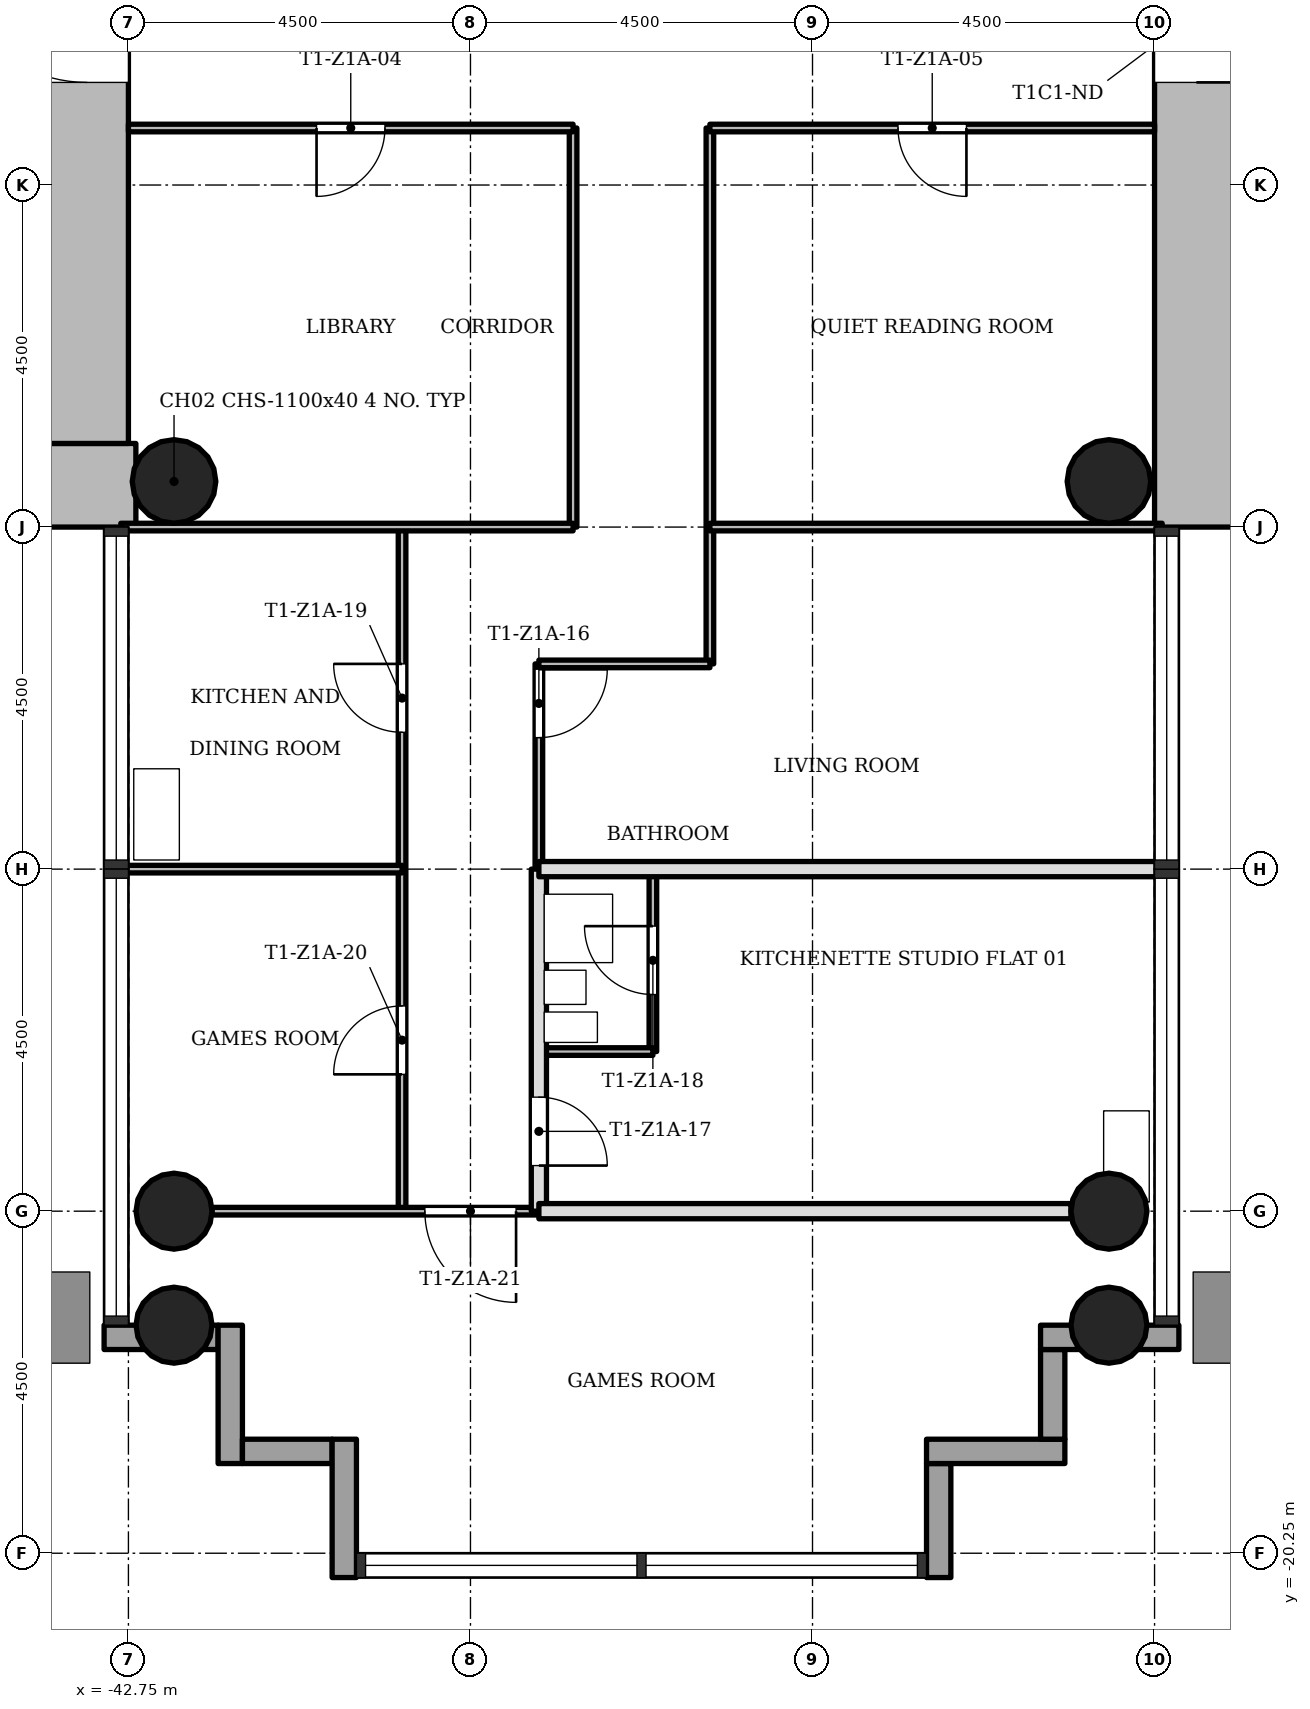
"""IFC4 building model, lengths in metres.
Left out: names, types, materials, properties, quantities, classifications, styles, units other than length and angle.
Written with IfcOpenShell. Run it as: python <this file> out.ifc"""

import sys

from ifc_helpers import new_model, si_unit, direction, frame, frame_2d, origin, origin_2d, place, context, subcontext, project, spatial, rectangle, hollow_circle, extrude, element, fill, save


model = new_model("IFC4")
c1 = context("Model", 3, precision=1e-05, world=origin(), true_north=direction((0.0, 1.0)))
c2 = subcontext(c1, "Body", "Model", "MODEL_VIEW")
j1 = project(units=[si_unit("LENGTHUNIT", "METRE"), si_unit("PLANEANGLEUNIT", "RADIAN")], contexts=[c1])
p1 = place(None, origin())
s1 = spatial("IfcSite", under=j1, at=p1, CompositionType="ELEMENT")
p2 = place(p1, origin())
s2 = spatial("IfcBuilding", under=s1, at=p2, CompositionType="ELEMENT")
p3 = place(p2, frame((0.0, 0.0, 31.3)))
s3 = spatial("IfcBuildingStorey", under=s2, at=p3, CompositionType="ELEMENT", Elevation=31.3)
p4 = place(p3, frame((-28.7, 5.65, 0.0), z_axis=(0.0, 0.0, 1.0), x_axis=(0.0, -1.0, 0.0)))
e1 = element("IfcWall", 1, at=p4, inside=s3, PredefinedType="SHEAR", context=c2, shape_type="SweptSolid", body=[
    extrude(rectangle(XDim=12.4, YDim=1.1, at=frame_2d((6.2, 0.0))), origin(), (0.0, 0.0, 1.0), 3.4),
])
p5 = place(p4, frame((4.75, 0.0, 0.0)))
e2 = element("IfcOpeningElement", 2, at=p5, cuts=e1, PredefinedType="OPENING", context=c2, shape_type="SweptSolid", body=[
    extrude(rectangle(XDim=1.8, YDim=2.1, at=frame_2d((0.9, 1.05))), frame((0.0, 0.56, 0.0), z_axis=(0.0, -1.0, 0.0), x_axis=(1.0, 0.0, 0.0)), (0.0, 0.0, 1.0), 1.12),
])
p6 = place(p3, frame((-50.65, -6.2, 0.0), z_axis=(0.0, 0.0, 1.0), x_axis=(1.0, 0.0, 0.0)))
e3 = element("IfcWall", 3, at=p6, inside=s3, PredefinedType="SHEAR", context=c2, shape_type="SweptSolid", body=[
    extrude(rectangle(XDim=7.998, YDim=1.1, at=frame_2d((3.999, 0.0))), origin(), (0.0, 0.0, 1.0), 3.4),
])
p7 = place(p3, frame((-43.3, -5.65, 0.0), z_axis=(0.0, 0.0, 1.0), x_axis=(0.0, 1.0, 0.0)))
e4 = element("IfcWall", 4, at=p7, inside=s3, PredefinedType="SHEAR", context=c2, shape_type="SweptSolid", body=[
    extrude(rectangle(XDim=12.4, YDim=1.1, at=frame_2d((6.2, 0.0))), origin(), (0.0, 0.0, 1.0), 3.4),
])
p8 = place(p7, frame((4.75, 0.0, 0.0)))
e5 = element("IfcOpeningElement", 5, at=p8, cuts=e4, PredefinedType="OPENING", context=c2, shape_type="SweptSolid", body=[
    extrude(rectangle(XDim=1.8, YDim=2.1, at=frame_2d((0.9, 1.05))), frame((0.0, 0.56, 0.0), z_axis=(0.0, -1.0, 0.0), x_axis=(1.0, 0.0, 0.0)), (0.0, 0.0, 1.0), 1.12),
])
for number, where, z_axis, x_axis in (
    (6, (-42.15, -15.75, 0.0), (0.0, 0.0, 1.0), (1.0, 0.0, 0.0)),
    (7, (-29.85, -15.75, 0.0), (0.0, 0.0, 1.0), (1.0, 0.0, 0.0)),
    (8, (-42.15, -17.25, 0.0), (0.0, 0.0, 1.0), (1.0, 0.0, 0.0)),
    (9, (-29.85, -17.25, 0.0), (0.0, 0.0, 1.0), (1.0, 0.0, 0.0)),
):
    element("IfcColumn", number, at=place(p3, frame(where, z_axis=z_axis, x_axis=x_axis)), inside=s3, PredefinedType="COLUMN", context=c2, shape_type="SweptSolid", body=[
        extrude(hollow_circle(Radius=0.5, WallThickness=0.036, at=origin_2d()), origin(), (0.0, 0.0, 1.0), 3.4),
    ])
for number, where, z_axis, x_axis in (
    (10, (-42.15, -6.15, 0.0), (0.0, 0.0, 1.0), (1.0, 0.0, 0.0)),
    (11, (-29.85, -6.15, 0.0), (0.0, 0.0, 1.0), (1.0, 0.0, 0.0)),
):
    element("IfcColumn", number, at=place(p3, frame(where, z_axis=z_axis, x_axis=x_axis)), inside=s3, PredefinedType="COLUMN", context=c2, shape_type="SweptSolid", body=[
        extrude(hollow_circle(Radius=0.55, WallThickness=0.04, at=origin_2d()), origin(), (0.0, 0.0, 1.0), 3.4),
    ])
p9 = place(p3, frame((-43.07, -17.41, -0.3), z_axis=(0.0, 0.0, 1.0), x_axis=(1.0, 0.0, 0.0)))
e12 = element("IfcWall", 12, at=p9, inside=s3, PredefinedType="STANDARD", context=c2, shape_type="SweptSolid", body=[
    extrude(rectangle(XDim=1.5, YDim=0.32, at=frame_2d((0.75, 0.0))), origin(), (0.0, 0.0, 1.0), 3.4),
])
p10 = place(p3, frame((-41.41, -17.25, -0.3), z_axis=(0.0, 0.0, 1.0), x_axis=(0.0, -1.0, 0.0)))
e13 = element("IfcWall", 13, at=p10, inside=s3, PredefinedType="STANDARD", context=c2, shape_type="SweptSolid", body=[
    extrude(rectangle(XDim=1.82, YDim=0.32, at=frame_2d((0.91, 0.0))), origin(), (0.0, 0.0, 1.0), 3.4),
])
p11 = place(p3, frame((-41.25, -18.91, -0.3), z_axis=(0.0, 0.0, 1.0), x_axis=(1.0, 0.0, 0.0)))
e14 = element("IfcWall", 14, at=p11, inside=s3, PredefinedType="STANDARD", context=c2, shape_type="SweptSolid", body=[
    extrude(rectangle(XDim=1.18, YDim=0.32, at=frame_2d((0.59, 0.0))), origin(), (0.0, 0.0, 1.0), 3.4),
])
p12 = place(p3, frame((-39.91, -18.75, -0.3), z_axis=(0.0, 0.0, 1.0), x_axis=(0.0, -1.0, 0.0)))
e15 = element("IfcWall", 15, at=p12, inside=s3, PredefinedType="STANDARD", context=c2, shape_type="SweptSolid", body=[
    extrude(rectangle(XDim=1.82, YDim=0.32, at=frame_2d((0.91, 0.0))), origin(), (0.0, 0.0, 1.0), 3.4),
])
p13 = place(p3, frame((-32.09, -20.57, -0.3), z_axis=(0.0, 0.0, 1.0), x_axis=(0.0, 1.0, 0.0)))
e16 = element("IfcWall", 16, at=p13, inside=s3, PredefinedType="STANDARD", context=c2, shape_type="SweptSolid", body=[
    extrude(rectangle(XDim=1.5, YDim=0.32, at=frame_2d((0.75, 0.0))), origin(), (0.0, 0.0, 1.0), 3.4),
])
p14 = place(p3, frame((-32.25, -18.91, -0.3), z_axis=(0.0, 0.0, 1.0), x_axis=(1.0, 0.0, 0.0)))
e17 = element("IfcWall", 17, at=p14, inside=s3, PredefinedType="STANDARD", context=c2, shape_type="SweptSolid", body=[
    extrude(rectangle(XDim=1.82, YDim=0.32, at=frame_2d((0.91, 0.0))), origin(), (0.0, 0.0, 1.0), 3.4),
])
p15 = place(p3, frame((-30.59, -18.75, -0.3), z_axis=(0.0, 0.0, 1.0), x_axis=(0.0, 1.0, 0.0)))
e18 = element("IfcWall", 18, at=p15, inside=s3, PredefinedType="STANDARD", context=c2, shape_type="SweptSolid", body=[
    extrude(rectangle(XDim=1.18, YDim=0.32, at=frame_2d((0.59, 0.0))), origin(), (0.0, 0.0, 1.0), 3.4),
])
p16 = place(p3, frame((-30.75, -17.41, -0.3), z_axis=(0.0, 0.0, 1.0), x_axis=(1.0, 0.0, 0.0)))
e19 = element("IfcWall", 19, at=p16, inside=s3, PredefinedType="STANDARD", context=c2, shape_type="SweptSolid", body=[
    extrude(rectangle(XDim=1.82, YDim=0.32, at=frame_2d((0.91, 0.0))), origin(), (0.0, 0.0, 1.0), 3.4),
])
p17 = place(p3, frame((-39.15, -15.75, 0.0), z_axis=(0.0, 0.0, 1.0), x_axis=(0.0, 1.0, 0.0)))
e20 = element("IfcWall", 20, at=p17, inside=s3, PredefinedType="PARTITIONING", context=c2, shape_type="SweptSolid", body=[
    extrude(rectangle(XDim=9.0, YDim=0.1, at=frame_2d((4.5, 0.0))), origin(), (0.0, 0.0, 1.0), 3.0),
])
p18 = place(p17, frame((6.3, 0.0, 0.0)))
e21 = element("IfcOpeningElement", 21, at=p18, cuts=e20, PredefinedType="OPENING", context=c2, shape_type="SweptSolid", body=[
    extrude(rectangle(XDim=0.9, YDim=2.1, at=frame_2d((0.45, 1.05))), frame((0.0, 0.06, 0.0), z_axis=(0.0, -1.0, 0.0), x_axis=(1.0, 0.0, 0.0)), (0.0, 0.0, 1.0), 0.12),
])
p19 = place(p17, frame((1.8, 0.0, 0.0)))
e22 = element("IfcOpeningElement", 22, at=p19, cuts=e20, PredefinedType="OPENING", context=c2, shape_type="SweptSolid", body=[
    extrude(rectangle(XDim=0.9, YDim=2.1, at=frame_2d((0.45, 1.05))), frame((0.0, 0.06, 0.0), z_axis=(0.0, -1.0, 0.0), x_axis=(1.0, 0.0, 0.0)), (0.0, 0.0, 1.0), 0.12),
])
p20 = place(p3, frame((-37.35, -11.25, 0.0), z_axis=(0.0, 0.0, 1.0), x_axis=(0.0, 1.0, 0.0)))
e23 = element("IfcWall", 23, at=p20, inside=s3, PredefinedType="PARTITIONING", context=c2, shape_type="SweptSolid", body=[
    extrude(rectangle(XDim=2.7, YDim=0.1, at=frame_2d((1.35, 0.0))), origin(), (0.0, 0.0, 1.0), 3.0),
])
p21 = place(p20, frame((1.73, 0.0, 0.0)))
e24 = element("IfcOpeningElement", 24, at=p21, cuts=e23, PredefinedType="OPENING", context=c2, shape_type="SweptSolid", body=[
    extrude(rectangle(XDim=0.9, YDim=2.1, at=frame_2d((0.45, 1.05))), frame((0.0, 0.06, 0.0), z_axis=(0.0, -1.0, 0.0), x_axis=(1.0, 0.0, 0.0)), (0.0, 0.0, 1.0), 0.12),
])
p22 = place(p3, frame((-37.35, -15.75, 0.0), z_axis=(0.0, 0.0, 1.0), x_axis=(0.0, 1.0, 0.0)))
e25 = element("IfcWall", 25, at=p22, inside=s3, PredefinedType="SOLIDWALL", context=c2, shape_type="SweptSolid", body=[
    extrude(rectangle(XDim=4.5, YDim=0.2, at=frame_2d((2.25, 0.0))), origin(), (0.0, 0.0, 1.0), 3.0),
])
p23 = place(p22, frame((0.6, 0.0, 0.0)))
e26 = element("IfcOpeningElement", 26, at=p23, cuts=e25, PredefinedType="OPENING", context=c2, shape_type="SweptSolid", body=[
    extrude(rectangle(XDim=0.9, YDim=2.1, at=frame_2d((0.45, 1.05))), frame((0.0, 0.11, 0.0), z_axis=(0.0, -1.0, 0.0), x_axis=(1.0, 0.0, 0.0)), (0.0, 0.0, 1.0), 0.22),
])
p24 = place(p3, frame((-36.9, -6.75, 0.0), z_axis=(0.0, 0.0, 1.0), x_axis=(0.0, 1.0, 0.0)))
e27 = element("IfcWall", 27, at=p24, inside=s3, PredefinedType="PARTITIONING", context=c2, shape_type="SweptSolid", body=[
    extrude(rectangle(XDim=5.25, YDim=0.1, at=frame_2d((2.625, 0.0))), origin(), (0.0, 0.0, 1.0), 3.0),
])
p25 = place(p3, frame((-35.85, -13.65, 0.0), z_axis=(0.0, 0.0, 1.0), x_axis=(0.0, 1.0, 0.0)))
e28 = element("IfcWall", 28, at=p25, inside=s3, PredefinedType="PARTITIONING", context=c2, shape_type="SweptSolid", body=[
    extrude(rectangle(XDim=2.4, YDim=0.1, at=frame_2d((1.2, 0.0))), origin(), (0.0, 0.0, 1.0), 3.0),
])
p26 = place(p25, frame((0.75, 0.0, 0.0)))
e29 = element("IfcOpeningElement", 29, at=p26, cuts=e28, PredefinedType="OPENING", context=c2, shape_type="SweptSolid", body=[
    extrude(rectangle(XDim=0.9, YDim=2.1, at=frame_2d((0.45, 1.05))), frame((0.0, 0.06, 0.0), z_axis=(0.0, -1.0, 0.0), x_axis=(1.0, 0.0, 0.0)), (0.0, 0.0, 1.0), 0.12),
])
p27 = place(p3, frame((-35.1, -8.55, 0.0), z_axis=(0.0, 0.0, 1.0), x_axis=(0.0, 1.0, 0.0)))
e30 = element("IfcWall", 30, at=p27, inside=s3, PredefinedType="PARTITIONING", context=c2, shape_type="SweptSolid", body=[
    extrude(rectangle(XDim=7.05, YDim=0.1, at=frame_2d((3.525, 0.0))), origin(), (0.0, 0.0, 1.0), 3.0),
])
p28 = place(p3, frame((-41.65, -15.75, 0.0), z_axis=(0.0, 0.0, 1.0), x_axis=(1.0, 0.0, 0.0)))
e31 = element("IfcWall", 31, at=p28, inside=s3, PredefinedType="PARTITIONING", context=c2, shape_type="SweptSolid", body=[
    extrude(rectangle(XDim=4.3, YDim=0.1, at=frame_2d((2.15, 0.0))), origin(), (0.0, 0.0, 1.0), 3.0),
])
p29 = place(p28, frame((2.8, 0.0, 0.0)))
e32 = element("IfcOpeningElement", 32, at=p29, cuts=e31, PredefinedType="OPENING", context=c2, shape_type="SweptSolid", body=[
    extrude(rectangle(XDim=1.2, YDim=2.1, at=frame_2d((0.6, 1.05))), frame((0.0, 0.06, 0.0), z_axis=(0.0, -1.0, 0.0), x_axis=(1.0, 0.0, 0.0)), (0.0, 0.0, 1.0), 0.12),
])
p30 = place(p3, frame((-37.35, -15.75, 0.0), z_axis=(0.0, 0.0, 1.0), x_axis=(1.0, 0.0, 0.0)))
e33 = element("IfcWall", 33, at=p30, inside=s3, PredefinedType="SOLIDWALL", context=c2, shape_type="SweptSolid", body=[
    extrude(rectangle(XDim=7.0, YDim=0.2, at=frame_2d((3.5, 0.0))), origin(), (0.0, 0.0, 1.0), 3.0),
])
p31 = place(p3, frame((-37.35, -13.65, 0.0), z_axis=(0.0, 0.0, 1.0), x_axis=(1.0, 0.0, 0.0)))
e34 = element("IfcWall", 34, at=p31, inside=s3, PredefinedType="PARTITIONING", context=c2, shape_type="SweptSolid", body=[
    extrude(rectangle(XDim=1.5, YDim=0.1, at=frame_2d((0.75, 0.0))), origin(), (0.0, 0.0, 1.0), 3.0),
])
p32 = place(p3, frame((-42.85, -11.25, 0.0), z_axis=(0.0, 0.0, 1.0), x_axis=(1.0, 0.0, 0.0)))
e35 = element("IfcWall", 35, at=p32, inside=s3, PredefinedType="PARTITIONING", context=c2, shape_type="SweptSolid", body=[
    extrude(rectangle(XDim=3.7, YDim=0.1, at=frame_2d((1.85, 0.0))), origin(), (0.0, 0.0, 1.0), 3.0),
])
p33 = place(p3, frame((-37.35, -11.25, 0.0), z_axis=(0.0, 0.0, 1.0), x_axis=(1.0, 0.0, 0.0)))
e36 = element("IfcWall", 36, at=p33, inside=s3, PredefinedType="SOLIDWALL", context=c2, shape_type="SweptSolid", body=[
    extrude(rectangle(XDim=8.2, YDim=0.2, at=frame_2d((4.1, 0.0))), origin(), (0.0, 0.0, 1.0), 3.0),
])
p34 = place(p3, frame((-37.35, -8.55, 0.0), z_axis=(0.0, 0.0, 1.0), x_axis=(1.0, 0.0, 0.0)))
e37 = element("IfcWall", 37, at=p34, inside=s3, PredefinedType="PARTITIONING", context=c2, shape_type="SweptSolid", body=[
    extrude(rectangle(XDim=2.25, YDim=0.1, at=frame_2d((1.125, 0.0))), origin(), (0.0, 0.0, 1.0), 3.0),
])
for number, where, z_axis, x_axis in (
    (38, (-42.85, -6.75, 0.0), (0.0, 0.0, 1.0), (1.0, 0.0, 0.0)),
    (39, (-35.1, -6.75, 0.0), (0.0, 0.0, 1.0), (1.0, 0.0, 0.0)),
):
    element("IfcWall", number, at=place(p3, frame(where, z_axis=z_axis, x_axis=x_axis)), inside=s3, PredefinedType="PARTITIONING", context=c2, shape_type="SweptSolid", body=[
        extrude(rectangle(XDim=5.95, YDim=0.1, at=frame_2d((2.975, 0.0))), origin(), (0.0, 0.0, 1.0), 3.0),
    ])
p35 = place(p3, frame((-42.75, -1.5, 0.0), z_axis=(0.0, 0.0, 1.0), x_axis=(1.0, 0.0, 0.0)))
e40 = element("IfcWall", 40, at=p35, inside=s3, PredefinedType="PARTITIONING", context=c2, shape_type="SweptSolid", body=[
    extrude(rectangle(XDim=5.85, YDim=0.1, at=frame_2d((2.925, 0.0))), origin(), (0.0, 0.0, 1.0), 3.0),
])
p36 = place(p35, frame((2.475, 0.0, 0.0)))
e41 = element("IfcOpeningElement", 41, at=p36, cuts=e40, PredefinedType="OPENING", context=c2, shape_type="SweptSolid", body=[
    extrude(rectangle(XDim=0.9, YDim=2.1, at=frame_2d((0.45, 1.05))), frame((0.0, 0.06, 0.0), z_axis=(0.0, -1.0, 0.0), x_axis=(1.0, 0.0, 0.0)), (0.0, 0.0, 1.0), 0.12),
])
p37 = place(p3, frame((-35.1, -1.5, 0.0), z_axis=(0.0, 0.0, 1.0), x_axis=(1.0, 0.0, 0.0)))
e42 = element("IfcWall", 42, at=p37, inside=s3, PredefinedType="PARTITIONING", context=c2, shape_type="SweptSolid", body=[
    extrude(rectangle(XDim=5.85, YDim=0.1, at=frame_2d((2.925, 0.0))), origin(), (0.0, 0.0, 1.0), 3.0),
])
p38 = place(p37, frame((2.475, 0.0, 0.0)))
e43 = element("IfcOpeningElement", 43, at=p38, cuts=e42, PredefinedType="OPENING", context=c2, shape_type="SweptSolid", body=[
    extrude(rectangle(XDim=0.9, YDim=2.1, at=frame_2d((0.45, 1.05))), frame((0.0, 0.06, 0.0), z_axis=(0.0, -1.0, 0.0), x_axis=(1.0, 0.0, 0.0)), (0.0, 0.0, 1.0), 0.12),
])
p39 = place(p36, origin())
e44 = element("IfcDoor", 44, at=p39, inside=s3, OperationType="SINGLE_SWING_LEFT", PredefinedType="DOOR", context=c2, shape_type="SweptSolid", body=[
    extrude(rectangle(XDim=0.9, YDim=2.1, at=frame_2d((0.45, 1.05))), frame((0.0, 0.025, 0.0), z_axis=(0.0, -1.0, 0.0), x_axis=(1.0, 0.0, 0.0)), (0.0, 0.0, 1.0), 0.05),
])
fill(e41, e44)
p40 = place(p38, origin())
e45 = element("IfcDoor", 45, at=p40, inside=s3, OperationType="SINGLE_SWING_RIGHT", PredefinedType="DOOR", context=c2, shape_type="SweptSolid", body=[
    extrude(rectangle(XDim=0.9, YDim=2.1, at=frame_2d((0.45, 1.05))), frame((0.0, 0.025, 0.0), z_axis=(0.0, -1.0, 0.0), x_axis=(1.0, 0.0, 0.0)), (0.0, 0.0, 1.0), 0.05),
])
fill(e43, e45)
p41 = place(p21, origin())
e46 = element("IfcDoor", 46, at=p41, inside=s3, OperationType="SINGLE_SWING_RIGHT", PredefinedType="DOOR", context=c2, shape_type="SweptSolid", body=[
    extrude(rectangle(XDim=0.9, YDim=2.1, at=frame_2d((0.45, 1.05))), frame((0.0, 0.025, 0.0), z_axis=(0.0, -1.0, 0.0), x_axis=(1.0, 0.0, 0.0)), (0.0, 0.0, 1.0), 0.05),
])
fill(e24, e46)
p42 = place(p23, origin())
e47 = element("IfcDoor", 47, at=p42, inside=s3, OperationType="SINGLE_SWING_LEFT", PredefinedType="DOOR", context=c2, shape_type="SweptSolid", body=[
    extrude(rectangle(XDim=0.9, YDim=2.1, at=frame_2d((0.45, 1.05))), frame((0.0, 0.025, 0.0), z_axis=(0.0, -1.0, 0.0), x_axis=(1.0, 0.0, 0.0)), (0.0, 0.0, 1.0), 0.05),
])
fill(e26, e47)
p43 = place(p26, origin())
e48 = element("IfcDoor", 48, at=p43, inside=s3, OperationType="SINGLE_SWING_LEFT", PredefinedType="DOOR", context=c2, shape_type="SweptSolid", body=[
    extrude(rectangle(XDim=0.9, YDim=2.1, at=frame_2d((0.45, 1.05))), frame((0.0, 0.025, 0.0), z_axis=(0.0, -1.0, 0.0), x_axis=(1.0, 0.0, 0.0)), (0.0, 0.0, 1.0), 0.05),
])
fill(e29, e48)
p44 = place(p18, origin())
e49 = element("IfcDoor", 49, at=p44, inside=s3, OperationType="SINGLE_SWING_LEFT", PredefinedType="DOOR", context=c2, shape_type="SweptSolid", body=[
    extrude(rectangle(XDim=0.9, YDim=2.1, at=frame_2d((0.45, 1.05))), frame((0.0, 0.025, 0.0), z_axis=(0.0, -1.0, 0.0), x_axis=(1.0, 0.0, 0.0)), (0.0, 0.0, 1.0), 0.05),
])
fill(e21, e49)
p45 = place(p19, origin())
e50 = element("IfcDoor", 50, at=p45, inside=s3, OperationType="SINGLE_SWING_RIGHT", PredefinedType="DOOR", context=c2, shape_type="SweptSolid", body=[
    extrude(rectangle(XDim=0.9, YDim=2.1, at=frame_2d((0.45, 1.05))), frame((0.0, 0.025, 0.0), z_axis=(0.0, -1.0, 0.0), x_axis=(1.0, 0.0, 0.0)), (0.0, 0.0, 1.0), 0.05),
])
fill(e22, e50)
p46 = place(p29, origin())
e51 = element("IfcDoor", 51, at=p46, inside=s3, OperationType="SINGLE_SWING_RIGHT", PredefinedType="DOOR", context=c2, shape_type="SweptSolid", body=[
    extrude(rectangle(XDim=1.2, YDim=2.1, at=frame_2d((0.6, 1.05))), frame((0.0, 0.025, 0.0), z_axis=(0.0, -1.0, 0.0), x_axis=(1.0, 0.0, 0.0)), (0.0, 0.0, 1.0), 0.05),
])
fill(e32, e51)
p47 = place(p5, origin())
e52 = element("IfcDoor", 52, at=p47, inside=s3, OperationType="SINGLE_SWING_LEFT", PredefinedType="DOOR", context=c2, shape_type="SweptSolid", body=[
    extrude(rectangle(XDim=1.8, YDim=2.1, at=frame_2d((0.9, 1.05))), frame((0.0, 0.025, 0.0), z_axis=(0.0, -1.0, 0.0), x_axis=(1.0, 0.0, 0.0)), (0.0, 0.0, 1.0), 0.05),
])
fill(e2, e52)
p48 = place(p8, origin())
e53 = element("IfcDoor", 53, at=p48, inside=s3, OperationType="SINGLE_SWING_LEFT", PredefinedType="DOOR", context=c2, shape_type="SweptSolid", body=[
    extrude(rectangle(XDim=1.8, YDim=2.1, at=frame_2d((0.9, 1.05))), frame((0.0, 0.025, 0.0), z_axis=(0.0, -1.0, 0.0), x_axis=(1.0, 0.0, 0.0)), (0.0, 0.0, 1.0), 0.05),
])
fill(e5, e53)
save(model, sys.argv[1])
